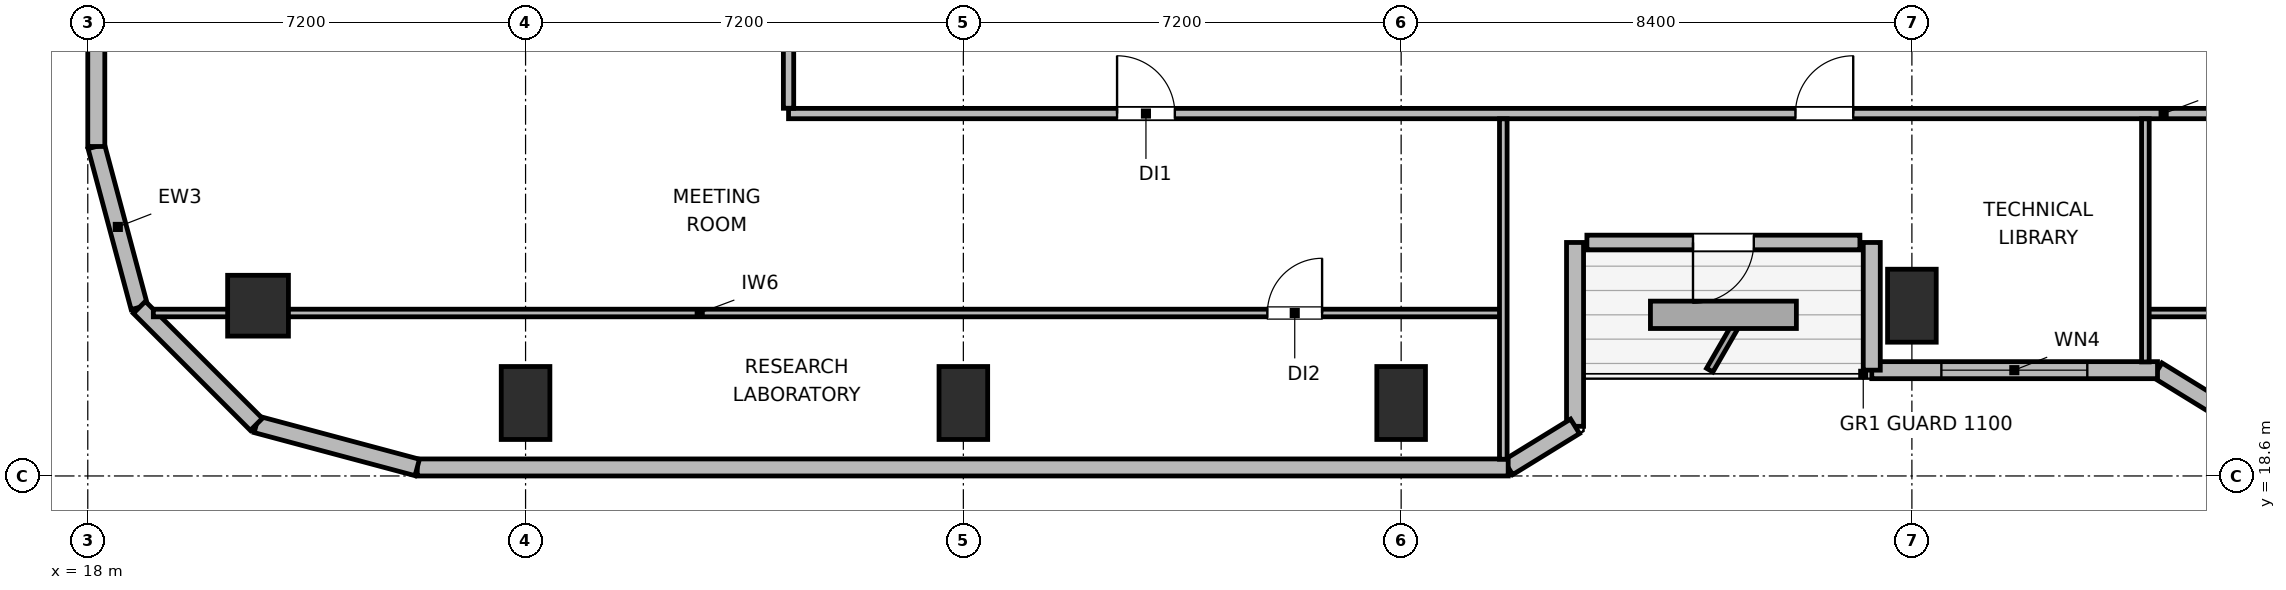
"""IFC4 building model, lengths in metres.
Left out: names, types, materials, properties, quantities, classifications, styles, units other than length and angle.
Written with IfcOpenShell. Run it as: python <this file> out.ifc"""

import sys

from ifc_helpers import new_model, si_unit, direction, frame, frame_2d, origin, origin_2d, place, context, subcontext, project, spatial, rectangle, circle, extrude, element, fill, save


model = new_model("IFC4")
c1 = context("Model", 3, precision=1e-05, world=origin(), true_north=direction((0.0, 1.0)))
c2 = subcontext(c1, "Body", "Model", "MODEL_VIEW")
j1 = project(units=[si_unit("LENGTHUNIT", "METRE"), si_unit("PLANEANGLEUNIT", "RADIAN")], contexts=[c1])
p1 = place(None, origin())
s1 = spatial("IfcSite", under=j1, at=p1, CompositionType="ELEMENT")
p2 = place(p1, origin())
s2 = spatial("IfcBuilding", under=s1, at=p2, CompositionType="ELEMENT")
p3 = place(p2, frame((0.0, 0.0, 174.0)))
s3 = spatial("IfcBuildingStorey", under=s2, at=p3, CompositionType="ELEMENT", Elevation=174.0)
p4 = place(p3, frame((20.8, 21.4, 0.0), z_axis=(0.0, 0.0, 1.0), x_axis=(1.0, 0.0, 0.0)))
e1 = element("IfcColumn", 1, at=p4, inside=s3, PredefinedType="COLUMN", context=c2, shape_type="SweptSolid", body=[
    extrude(circle(Radius=0.5, at=origin_2d()), origin(), (0.0, 0.0, 1.0), 3.9),
])
for number, where, z_axis, x_axis in (
    (2, (25.2, 19.8, 0.0), (0.0, 0.0, 1.0), (1.0, 0.0, 0.0)),
    (3, (32.4, 19.8, 0.0), (0.0, 0.0, 1.0), (1.0, 0.0, 0.0)),
    (4, (39.6, 19.8, 0.0), (0.0, 0.0, 1.0), (1.0, 0.0, 0.0)),
    (5, (48.0, 21.4, 0.0), (0.0, 0.0, 1.0), (1.0, 0.0, 0.0)),
):
    element("IfcColumn", number, at=place(p3, frame(where, z_axis=z_axis, x_axis=x_axis)), inside=s3, PredefinedType="COLUMN", context=c2, shape_type="SweptSolid", body=[
        extrude(rectangle(XDim=0.8, YDim=1.2, at=origin_2d()), origin(), (0.0, 0.0, 1.0), 3.9),
    ])
p5 = place(p3, frame((18.848, 21.373, 0.0), z_axis=(0.0, 0.0, 1.0), x_axis=(-0.258672222976, 0.9659651552, 0.0)))
e6 = element("IfcWall", 6, at=p5, inside=s3, PredefinedType="SOLIDWALL", context=c2, shape_type="SweptSolid", body=[
    extrude(rectangle(XDim=2.739, YDim=0.28, at=frame_2d((1.37, 0.0))), origin(), (0.0, 0.0, 1.0), 3.68),
])
p6 = place(p3, frame((18.14, 24.018, 0.0), z_axis=(0.0, 0.0, 1.0), x_axis=(0.0, 1.0, 0.0)))
e7 = element("IfcWall", 7, at=p6, inside=s3, PredefinedType="SOLIDWALL", context=c2, shape_type="SweptSolid", body=[
    extrude(rectangle(XDim=5.242, YDim=0.28, at=frame_2d((2.621, 0.0))), origin(), (0.0, 0.0, 1.0), 3.68),
])
p7 = place(p3, frame((54.64, 18.74, 0.0), z_axis=(0.0, 0.0, 1.0), x_axis=(-0.851652825334, 0.524106349037, 0.0)))
e8 = element("IfcWall", 8, at=p7, inside=s3, PredefinedType="SOLIDWALL", context=c2, shape_type="SweptSolid", body=[
    extrude(rectangle(XDim=3.053, YDim=0.28, at=frame_2d((1.526, 0.0))), origin(), (0.0, 0.0, 1.0), 2.265),
])
p8 = place(p3, frame((52.04, 20.34, 0.0), z_axis=(0.0, 0.0, 1.0), x_axis=(-1.0, 0.0, 0.0)))
e9 = element("IfcWall", 9, at=p8, inside=s3, PredefinedType="SOLIDWALL", context=c2, shape_type="SweptSolid", body=[
    extrude(rectangle(XDim=4.699, YDim=0.28, at=frame_2d((2.35, 0.0))), origin(), (0.0, 0.0, 1.0), 2.265),
])
p9 = place(p8, frame((1.155, 0.0, 0.85)))
e10 = element("IfcOpeningElement", 10, at=p9, cuts=e9, PredefinedType="OPENING", context=c2, shape_type="SweptSolid", body=[
    extrude(rectangle(XDim=2.4, YDim=1.15, at=frame_2d((1.2, 0.575))), frame((0.0, 0.15, 0.0), z_axis=(0.0, -1.0, 0.0), x_axis=(1.0, 0.0, 0.0)), (0.0, 0.0, 1.0), 0.3),
])
p10 = place(p3, frame((47.34, 20.34, 0.0), z_axis=(0.0, 0.0, 1.0), x_axis=(0.0, 1.0, 0.0)))
e11 = element("IfcWall", 11, at=p10, inside=s3, PredefinedType="SOLIDWALL", context=c2, shape_type="SweptSolid", body=[
    extrude(rectangle(XDim=2.1, YDim=0.28, at=frame_2d((1.05, 0.0))), origin(), (0.0, 0.0, 1.0), 2.265),
])
p11 = place(p3, frame((47.145, 22.44, 0.0), z_axis=(0.0, 0.0, 1.0), x_axis=(-1.0, 0.0, 0.0)))
e12 = element("IfcWall", 12, at=p11, inside=s3, PredefinedType="SOLIDWALL", context=c2, shape_type="SweptSolid", body=[
    extrude(rectangle(XDim=4.49, YDim=0.24, at=frame_2d((2.245, 0.0))), origin(), (0.0, 0.0, 1.0), 3.68),
])
p12 = place(p11, frame((1.745, 0.0, 0.0)))
e13 = element("IfcOpeningElement", 13, at=p12, cuts=e12, PredefinedType="OPENING", context=c2, shape_type="SweptSolid", body=[
    extrude(rectangle(XDim=1.0, YDim=2.02, at=frame_2d((0.5, 1.01))), frame((0.0, 0.13, 0.0), z_axis=(0.0, -1.0, 0.0), x_axis=(1.0, 0.0, 0.0)), (0.0, 0.0, 1.0), 0.26),
])
p13 = place(p3, frame((42.46, 22.44, 0.0), z_axis=(0.0, 0.0, 1.0), x_axis=(0.0, -1.0, 0.0)))
e14 = element("IfcWall", 14, at=p13, inside=s3, PredefinedType="SOLIDWALL", context=c2, shape_type="SweptSolid", body=[
    extrude(rectangle(XDim=3.024, YDim=0.28, at=frame_2d((1.512, 0.0))), origin(), (0.0, 0.0, 1.0), 2.265),
])
p14 = place(p3, frame((42.46, 19.416, 0.0), z_axis=(0.0, 0.0, 1.0), x_axis=(-0.851801140441, -0.523865266212, 0.0)))
e15 = element("IfcWall", 15, at=p14, inside=s3, PredefinedType="SOLIDWALL", context=c2, shape_type="SweptSolid", body=[
    extrude(rectangle(XDim=1.291, YDim=0.28, at=frame_2d((0.646, 0.0))), origin(), (0.0, 0.0, 1.0), 3.68),
])
p15 = place(p3, frame((41.36, 18.74, 0.0), z_axis=(0.0, 0.0, 1.0), x_axis=(-1.0, 0.0, 0.0)))
e16 = element("IfcWall", 16, at=p15, inside=s3, PredefinedType="SOLIDWALL", context=c2, shape_type="SweptSolid", body=[
    extrude(rectangle(XDim=17.942, YDim=0.28, at=frame_2d((8.971, 0.0))), origin(), (0.0, 0.0, 1.0), 3.68),
])
p16 = place(p3, frame((23.418, 18.74, 0.0), z_axis=(0.0, 0.0, 1.0), x_axis=(-0.965971118627, 0.258649952598, 0.0)))
e17 = element("IfcWall", 17, at=p16, inside=s3, PredefinedType="SOLIDWALL", context=c2, shape_type="SweptSolid", body=[
    extrude(rectangle(XDim=2.739, YDim=0.28, at=frame_2d((1.37, 0.0))), origin(), (0.0, 0.0, 1.0), 3.68),
])
p17 = place(p3, frame((20.772, 19.448, 0.0), z_axis=(0.0, 0.0, 1.0), x_axis=(-0.707106781187, 0.707106781187, 0.0)))
e18 = element("IfcWall", 18, at=p17, inside=s3, PredefinedType="SOLIDWALL", context=c2, shape_type="SweptSolid", body=[
    extrude(rectangle(XDim=2.721, YDim=0.28, at=frame_2d((1.36, 0.0))), origin(), (0.0, 0.0, 1.0), 3.68),
])
p18 = place(p3, frame((29.525, 24.56, 0.0), z_axis=(0.0, 0.0, 1.0), x_axis=(1.0, 0.0, 0.0)))
e19 = element("IfcWall", 19, at=p18, inside=s3, PredefinedType="PARTITIONING", context=c2, shape_type="SweptSolid", body=[
    extrude(rectangle(XDim=34.075, YDim=0.17, at=frame_2d((17.038, 0.0))), origin(), (0.0, 0.0, 1.0), 3.68),
])
p19 = place(p18, frame((5.403, 0.0, 0.0)))
e20 = element("IfcOpeningElement", 20, at=p19, cuts=e19, PredefinedType="OPENING", context=c2, shape_type="SweptSolid", body=[
    extrude(rectangle(XDim=0.95, YDim=2.04, at=frame_2d((0.475, 1.02))), frame((0.0, 0.095, 0.0), z_axis=(0.0, -1.0, 0.0), x_axis=(1.0, 0.0, 0.0)), (0.0, 0.0, 1.0), 0.19),
])
p20 = place(p18, frame((16.56, 0.0, 0.0)))
e21 = element("IfcOpeningElement", 21, at=p20, cuts=e19, PredefinedType="OPENING", context=c2, shape_type="SweptSolid", body=[
    extrude(rectangle(XDim=0.95, YDim=2.04, at=frame_2d((0.475, 1.02))), frame((0.0, 0.095, 0.0), z_axis=(0.0, -1.0, 0.0), x_axis=(1.0, 0.0, 0.0)), (0.0, 0.0, 1.0), 0.19),
])
p21 = place(p18, frame((27.72, 0.0, 0.0)))
e22 = element("IfcOpeningElement", 22, at=p21, cuts=e19, PredefinedType="OPENING", context=c2, shape_type="SweptSolid", body=[
    extrude(rectangle(XDim=0.95, YDim=2.04, at=frame_2d((0.475, 1.02))), frame((0.0, 0.095, 0.0), z_axis=(0.0, -1.0, 0.0), x_axis=(1.0, 0.0, 0.0)), (0.0, 0.0, 1.0), 0.19),
])
p22 = place(p3, frame((29.525, 24.647, 0.0), z_axis=(0.0, 0.0, 1.0), x_axis=(0.0, 1.0, 0.0)))
e23 = element("IfcWall", 23, at=p22, inside=s3, PredefinedType="PARTITIONING", context=c2, shape_type="SweptSolid", body=[
    extrude(rectangle(XDim=9.753, YDim=0.17, at=frame_2d((4.876, 0.0))), origin(), (0.0, 0.0, 1.0), 3.68),
])
p23 = place(p22, frame((4.358, 0.0, 0.0)))
e24 = element("IfcOpeningElement", 24, at=p23, cuts=e23, PredefinedType="OPENING", context=c2, shape_type="SweptSolid", body=[
    extrude(rectangle(XDim=0.95, YDim=2.04, at=frame_2d((0.475, 1.02))), frame((0.0, 0.095, 0.0), z_axis=(0.0, -1.0, 0.0), x_axis=(1.0, 0.0, 0.0)), (0.0, 0.0, 1.0), 0.19),
])
p24 = place(p3, frame((19.078, 21.28, 0.0), z_axis=(0.0, 0.0, 1.0), x_axis=(1.0, 0.0, 0.0)))
e25 = element("IfcWall", 25, at=p24, inside=s3, PredefinedType="PARTITIONING", context=c2, shape_type="SweptSolid", body=[
    extrude(rectangle(XDim=22.202, YDim=0.125, at=frame_2d((11.101, 0.0))), origin(), (0.0, 0.0, 1.0), 2.265),
])
p25 = place(p24, frame((18.322, 0.0, 0.0)))
e26 = element("IfcOpeningElement", 26, at=p25, cuts=e25, PredefinedType="OPENING", context=c2, shape_type="SweptSolid", body=[
    extrude(rectangle(XDim=0.9, YDim=2.02, at=frame_2d((0.45, 1.01))), frame((0.0, 0.073, 0.0), z_axis=(0.0, -1.0, 0.0), x_axis=(1.0, 0.0, 0.0)), (0.0, 0.0, 1.0), 0.145),
])
p26 = place(p3, frame((41.28, 18.875, 0.0), z_axis=(0.0, 0.0, 1.0), x_axis=(0.0, 1.0, 0.0)))
e27 = element("IfcWall", 27, at=p26, inside=s3, PredefinedType="PARTITIONING", context=c2, shape_type="SweptSolid", body=[
    extrude(rectangle(XDim=5.598, YDim=0.125, at=frame_2d((2.799, 0.0))), origin(), (0.0, 0.0, 1.0), 3.043),
])
p27 = place(p3, frame((51.84, 21.28, 0.0), z_axis=(0.0, 0.0, 1.0), x_axis=(1.0, 0.0, 0.0)))
e28 = element("IfcWall", 28, at=p27, inside=s3, PredefinedType="PARTITIONING", context=c2, shape_type="SweptSolid", body=[
    extrude(rectangle(XDim=17.882, YDim=0.125, at=frame_2d((8.941, 0.0))), origin(), (0.0, 0.0, 1.0), 2.265),
])
p28 = place(p27, frame((8.668, 0.0, 0.0)))
e29 = element("IfcOpeningElement", 29, at=p28, cuts=e28, PredefinedType="OPENING", context=c2, shape_type="SweptSolid", body=[
    extrude(rectangle(XDim=0.9, YDim=2.02, at=frame_2d((0.45, 1.01))), frame((0.0, 0.073, 0.0), z_axis=(0.0, -1.0, 0.0), x_axis=(1.0, 0.0, 0.0)), (0.0, 0.0, 1.0), 0.145),
])
p29 = place(p3, frame((51.84, 20.475, 0.0), z_axis=(0.0, 0.0, 1.0), x_axis=(0.0, 1.0, 0.0)))
e30 = element("IfcWall", 30, at=p29, inside=s3, PredefinedType="PARTITIONING", context=c2, shape_type="SweptSolid", body=[
    extrude(rectangle(XDim=3.998, YDim=0.125, at=frame_2d((1.999, 0.0))), origin(), (0.0, 0.0, 1.0), 3.68),
])
p30 = place(p9, origin())
e31 = element("IfcWindow", 31, at=p30, inside=s3, PartitioningType="SINGLE_PANEL", PredefinedType="WINDOW", context=c2, shape_type="SweptSolid", body=[
    extrude(rectangle(XDim=2.4, YDim=1.15, at=frame_2d((1.2, 0.575))), frame((0.0, 0.03, 0.0), z_axis=(0.0, -1.0, 0.0), x_axis=(1.0, 0.0, 0.0)), (0.0, 0.0, 1.0), 0.06),
])
fill(e10, e31)
p31 = place(p12, origin())
e32 = element("IfcDoor", 32, at=p31, inside=s3, OperationType="SINGLE_SWING_RIGHT", PredefinedType="DOOR", context=c2, shape_type="SweptSolid", body=[
    extrude(rectangle(XDim=1.0, YDim=2.02, at=frame_2d((0.5, 1.01))), frame((0.0, 0.025, 0.0), z_axis=(0.0, -1.0, 0.0), x_axis=(1.0, 0.0, 0.0)), (0.0, 0.0, 1.0), 0.05),
])
fill(e13, e32)
p32 = place(p25, origin())
e33 = element("IfcDoor", 33, at=p32, inside=s3, OperationType="SINGLE_SWING_RIGHT", PredefinedType="DOOR", context=c2, shape_type="SweptSolid", body=[
    extrude(rectangle(XDim=0.9, YDim=2.02, at=frame_2d((0.45, 1.01))), frame((0.0, 0.025, 0.0), z_axis=(0.0, -1.0, 0.0), x_axis=(1.0, 0.0, 0.0)), (0.0, 0.0, 1.0), 0.05),
])
fill(e26, e33)
p33 = place(p19, origin())
e34 = element("IfcDoor", 34, at=p33, inside=s3, OperationType="SINGLE_SWING_LEFT", PredefinedType="DOOR", context=c2, shape_type="SweptSolid", body=[
    extrude(rectangle(XDim=0.95, YDim=2.04, at=frame_2d((0.475, 1.02))), frame((0.0, 0.025, 0.0), z_axis=(0.0, -1.0, 0.0), x_axis=(1.0, 0.0, 0.0)), (0.0, 0.0, 1.0), 0.05),
])
fill(e20, e34)
p34 = place(p20, origin())
e35 = element("IfcDoor", 35, at=p34, inside=s3, OperationType="SINGLE_SWING_RIGHT", PredefinedType="DOOR", context=c2, shape_type="SweptSolid", body=[
    extrude(rectangle(XDim=0.95, YDim=2.04, at=frame_2d((0.475, 1.02))), frame((0.0, 0.025, 0.0), z_axis=(0.0, -1.0, 0.0), x_axis=(1.0, 0.0, 0.0)), (0.0, 0.0, 1.0), 0.05),
])
fill(e21, e35)
save(model, sys.argv[1])
